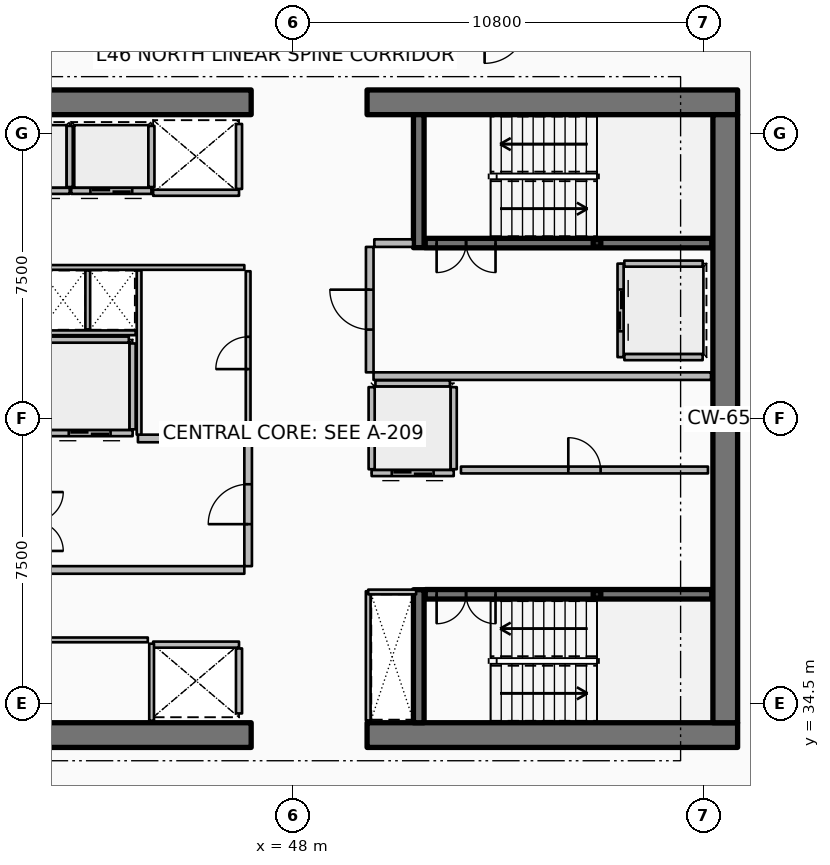
"""IFC4 building model, lengths in metres.
Left out: names, types, materials, properties, quantities, classifications, styles, units other than length and angle.
Written with IfcOpenShell. Run it as: python <this file> out.ifc"""

import sys

from ifc_helpers import new_model, si_unit, direction, frame, frame_2d, origin, origin_2d, place, context, subcontext, project, spatial, rectangle, hollow_rectangle, extrude, element, fill, save


model = new_model("IFC4")
c1 = context("Model", 3, precision=1e-05, world=origin(), true_north=direction((0.0, 1.0)))
c2 = subcontext(c1, "Body", "Model", "MODEL_VIEW")
j1 = project(units=[si_unit("LENGTHUNIT", "METRE"), si_unit("PLANEANGLEUNIT", "RADIAN")], contexts=[c1])
p1 = place(None, origin())
s1 = spatial("IfcSite", under=j1, at=p1, CompositionType="ELEMENT")
p2 = place(p1, origin())
s2 = spatial("IfcBuilding", under=s1, at=p2, CompositionType="ELEMENT")
p3 = place(p2, frame((0.0, 0.0, 184.05)))
s3 = spatial("IfcBuildingStorey", under=s2, at=p3, CompositionType="ELEMENT", Elevation=184.05)
for number, where, z_axis, x_axis in (
    (1, (37.15, 33.675, 0.0), (0.0, 0.0, 1.0), (1.0, 0.0, 0.0)),
    (2, (49.95, 33.675, 0.0), (0.0, 0.0, 1.0), (1.0, 0.0, 0.0)),
    (3, (37.15, 50.325, 0.0), (0.0, 0.0, 1.0), (1.0, 0.0, 0.0)),
    (4, (49.95, 50.325, 0.0), (0.0, 0.0, 1.0), (1.0, 0.0, 0.0)),
):
    element("IfcWall", number, at=place(p3, frame(where, z_axis=z_axis, x_axis=x_axis)), inside=s3, PredefinedType="SHEAR", context=c2, shape_type="SweptSolid", body=[
        extrude(rectangle(XDim=9.75, YDim=0.65, at=frame_2d((4.875, 0.0))), origin(), (0.0, 0.0, 1.0), 3.75),
    ])
p4 = place(p3, frame((59.375, 34.0, 0.0), z_axis=(0.0, 0.0, 1.0), x_axis=(0.0, 1.0, 0.0)))
e5 = element("IfcWall", 5, at=p4, inside=s3, PredefinedType="SHEAR", context=c2, shape_type="SweptSolid", body=[
    extrude(rectangle(XDim=16.0, YDim=0.65, at=frame_2d((8.0, 0.0))), origin(), (0.0, 0.0, 1.0), 3.75),
])
for number, where, z_axis, x_axis in (
    (6, (51.31, 46.5, 0.0), (0.0, 0.0, 1.0), (0.0, 1.0, 0.0)),
    (7, (51.31, 34.0, 0.0), (0.0, 0.0, 1.0), (0.0, 1.0, 0.0)),
):
    element("IfcWall", number, at=place(p3, frame(where, z_axis=z_axis, x_axis=x_axis)), inside=s3, PredefinedType="SHEAR", context=c2, shape_type="SweptSolid", body=[
        extrude(rectangle(XDim=3.5, YDim=0.28, at=frame_2d((1.75, 0.0))), origin(), (0.0, 0.0, 1.0), 3.75),
    ])
for number, where, z_axis, x_axis in (
    (8, (56.0, 46.62, 0.0), (0.0, 0.0, 1.0), (1.0, 0.0, 0.0)),
    (9, (56.0, 37.38, 0.0), (0.0, 0.0, 1.0), (1.0, 0.0, 0.0)),
):
    element("IfcColumn", number, at=place(p3, frame(where, z_axis=z_axis, x_axis=x_axis)), inside=s3, PredefinedType="COLUMN", context=c2, shape_type="SweptSolid", body=[
        extrude(hollow_rectangle(XDim=0.2, YDim=0.2, WallThickness=0.01, InnerFilletRadius=0.01, OuterFilletRadius=0.02, at=origin_2d()), origin(), (0.0, 0.0, 1.0), 1.67),
    ])
p5 = place(p3, frame((51.48, 46.62, 0.0), z_axis=(0.0, 0.0, 1.0), x_axis=(1.0, 0.0, 0.0)))
e10 = element("IfcWall", 10, at=p5, inside=s3, PredefinedType="SOLIDWALL", context=c2, shape_type="SweptSolid", body=[
    extrude(rectangle(XDim=7.54, YDim=0.25, at=frame_2d((3.77, 0.0))), origin(), (0.0, 0.0, 1.0), 3.5),
])
p6 = place(p5, frame((0.3, 0.0, 0.0)))
e11 = element("IfcOpeningElement", 11, at=p6, cuts=e10, PredefinedType="OPENING", context=c2, shape_type="SweptSolid", body=[
    extrude(rectangle(XDim=1.55, YDim=2.15, at=frame_2d((0.775, 1.075))), frame((0.0, 0.135, 0.0), z_axis=(0.0, -1.0, 0.0), x_axis=(1.0, 0.0, 0.0)), (0.0, 0.0, 1.0), 0.27),
])
p7 = place(p3, frame((51.48, 37.38, 0.0), z_axis=(0.0, 0.0, 1.0), x_axis=(1.0, 0.0, 0.0)))
e12 = element("IfcWall", 12, at=p7, inside=s3, PredefinedType="SOLIDWALL", context=c2, shape_type="SweptSolid", body=[
    extrude(rectangle(XDim=7.54, YDim=0.25, at=frame_2d((3.77, 0.0))), origin(), (0.0, 0.0, 1.0), 3.5),
])
p8 = place(p7, frame((0.3, 0.0, 0.0)))
e13 = element("IfcOpeningElement", 13, at=p8, cuts=e12, PredefinedType="OPENING", context=c2, shape_type="SweptSolid", body=[
    extrude(rectangle(XDim=1.55, YDim=2.15, at=frame_2d((0.775, 1.075))), frame((0.0, 0.135, 0.0), z_axis=(0.0, -1.0, 0.0), x_axis=(1.0, 0.0, 0.0)), (0.0, 0.0, 1.0), 0.27),
])
p9 = place(p3, frame((42.125, 47.995, 0.0), z_axis=(0.0, 0.0, 1.0), x_axis=(-1.0, 0.0, 0.0)))
e14 = element("IfcWall", 14, at=p9, inside=s3, PredefinedType="PARTITIONING", context=c2, shape_type="SweptSolid", body=[
    extrude(rectangle(XDim=2.11, YDim=0.16, at=frame_2d((1.055, 0.0))), origin(), (0.0, 0.0, 1.0), 3.5),
])
p10 = place(p9, frame((0.505, 0.0, 0.0)))
e15 = element("IfcOpeningElement", 15, at=p10, cuts=e14, PredefinedType="OPENING", context=c2, shape_type="SweptSolid", body=[
    extrude(rectangle(XDim=1.1, YDim=2.1, at=frame_2d((0.55, 1.05))), frame((0.0, 0.09, 0.0), z_axis=(0.0, -1.0, 0.0), x_axis=(1.0, 0.0, 0.0)), (0.0, 0.0, 1.0), 0.18),
])
p11 = place(p3, frame((42.125, 48.095, 0.0), z_axis=(0.0, 0.0, 1.0), x_axis=(0.0, 1.0, 0.0)))
e16 = element("IfcWall", 16, at=p11, inside=s3, PredefinedType="PARTITIONING", context=c2, shape_type="SweptSolid", body=[
    extrude(rectangle(XDim=1.61, YDim=0.16, at=frame_2d((0.805, 0.0))), origin(), (0.0, 0.0, 1.0), 3.5),
])
p12 = place(p3, frame((44.275, 47.995, 0.0), z_axis=(0.0, 0.0, 1.0), x_axis=(-1.0, 0.0, 0.0)))
e17 = element("IfcWall", 17, at=p12, inside=s3, PredefinedType="PARTITIONING", context=c2, shape_type="SweptSolid", body=[
    extrude(rectangle(XDim=2.11, YDim=0.16, at=frame_2d((1.055, 0.0))), origin(), (0.0, 0.0, 1.0), 3.5),
])
p13 = place(p12, frame((0.505, 0.0, 0.0)))
e18 = element("IfcOpeningElement", 18, at=p13, cuts=e17, PredefinedType="OPENING", context=c2, shape_type="SweptSolid", body=[
    extrude(rectangle(XDim=1.1, YDim=2.1, at=frame_2d((0.55, 1.05))), frame((0.0, 0.09, 0.0), z_axis=(0.0, -1.0, 0.0), x_axis=(1.0, 0.0, 0.0)), (0.0, 0.0, 1.0), 0.18),
])
p14 = place(p3, frame((44.275, 48.095, 0.0), z_axis=(0.0, 0.0, 1.0), x_axis=(0.0, 1.0, 0.0)))
e19 = element("IfcWall", 19, at=p14, inside=s3, PredefinedType="PARTITIONING", context=c2, shape_type="SweptSolid", body=[
    extrude(rectangle(XDim=1.61, YDim=0.16, at=frame_2d((0.805, 0.0))), origin(), (0.0, 0.0, 1.0), 3.5),
])
p15 = place(p3, frame((46.58, 47.945, 0.0), z_axis=(0.0, 0.0, 1.0), x_axis=(-1.0, 0.0, 0.0)))
e20 = element("IfcWall", 20, at=p15, inside=s3, PredefinedType="PARTITIONING", context=c2, shape_type="SweptSolid", body=[
    extrude(rectangle(XDim=2.26, YDim=0.16, at=frame_2d((1.13, 0.0))), origin(), (0.0, 0.0, 1.0), 3.5),
])
p16 = place(p3, frame((46.58, 48.045, 0.0), z_axis=(0.0, 0.0, 1.0), x_axis=(0.0, 1.0, 0.0)))
e21 = element("IfcWall", 21, at=p16, inside=s3, PredefinedType="PARTITIONING", context=c2, shape_type="SweptSolid", body=[
    extrude(rectangle(XDim=1.71, YDim=0.16, at=frame_2d((0.855, 0.0))), origin(), (0.0, 0.0, 1.0), 3.5),
])
p17 = place(p3, frame((44.32, 36.055, 0.0), z_axis=(0.0, 0.0, 1.0), x_axis=(1.0, 0.0, 0.0)))
e22 = element("IfcWall", 22, at=p17, inside=s3, PredefinedType="PARTITIONING", context=c2, shape_type="SweptSolid", body=[
    extrude(rectangle(XDim=2.26, YDim=0.16, at=frame_2d((1.13, 0.0))), origin(), (0.0, 0.0, 1.0), 3.5),
])
p18 = place(p3, frame((46.58, 34.245, 0.0), z_axis=(0.0, 0.0, 1.0), x_axis=(0.0, 1.0, 0.0)))
e23 = element("IfcWall", 23, at=p18, inside=s3, PredefinedType="PARTITIONING", context=c2, shape_type="SweptSolid", body=[
    extrude(rectangle(XDim=1.71, YDim=0.16, at=frame_2d((0.855, 0.0))), origin(), (0.0, 0.0, 1.0), 3.5),
])
p19 = place(p3, frame((43.78, 41.62, 0.0), z_axis=(0.0, 0.0, 1.0), x_axis=(-1.0, 0.0, 0.0)))
e24 = element("IfcWall", 24, at=p19, inside=s3, PredefinedType="PARTITIONING", context=c2, shape_type="SweptSolid", body=[
    extrude(rectangle(XDim=2.26, YDim=0.16, at=frame_2d((1.13, 0.0))), origin(), (0.0, 0.0, 1.0), 3.5),
])
p20 = place(p19, frame((0.58, 0.0, 0.0)))
e25 = element("IfcOpeningElement", 25, at=p20, cuts=e24, PredefinedType="OPENING", context=c2, shape_type="SweptSolid", body=[
    extrude(rectangle(XDim=1.1, YDim=2.1, at=frame_2d((0.55, 1.05))), frame((0.0, 0.09, 0.0), z_axis=(0.0, -1.0, 0.0), x_axis=(1.0, 0.0, 0.0)), (0.0, 0.0, 1.0), 0.18),
])
p21 = place(p3, frame((43.78, 41.72, 0.0), z_axis=(0.0, 0.0, 1.0), x_axis=(0.0, 1.0, 0.0)))
e26 = element("IfcWall", 26, at=p21, inside=s3, PredefinedType="PARTITIONING", context=c2, shape_type="SweptSolid", body=[
    extrude(rectangle(XDim=2.26, YDim=0.16, at=frame_2d((1.13, 0.0))), origin(), (0.0, 0.0, 1.0), 3.5),
])
p22 = place(p3, frame((41.62, 44.08, 0.0), z_axis=(0.0, 0.0, 1.0), x_axis=(1.0, 0.0, 0.0)))
e27 = element("IfcWall", 27, at=p22, inside=s3, PredefinedType="PARTITIONING", context=c2, shape_type="SweptSolid", body=[
    extrude(rectangle(XDim=2.06, YDim=0.16, at=frame_2d((1.03, 0.0))), origin(), (0.0, 0.0, 1.0), 3.5),
])
p23 = place(p3, frame((56.62, 46.08, 0.0), z_axis=(0.0, 0.0, 1.0), x_axis=(0.0, -1.0, 0.0)))
e28 = element("IfcWall", 28, at=p23, inside=s3, PredefinedType="PARTITIONING", context=c2, shape_type="SweptSolid", body=[
    extrude(rectangle(XDim=2.46, YDim=0.16, at=frame_2d((1.23, 0.0))), origin(), (0.0, 0.0, 1.0), 3.5),
])
p24 = place(p23, frame((0.68, 0.0, 0.0)))
e29 = element("IfcOpeningElement", 29, at=p24, cuts=e28, PredefinedType="OPENING", context=c2, shape_type="SweptSolid", body=[
    extrude(rectangle(XDim=1.1, YDim=2.1, at=frame_2d((0.55, 1.05))), frame((0.0, 0.09, 0.0), z_axis=(0.0, -1.0, 0.0), x_axis=(1.0, 0.0, 0.0)), (0.0, 0.0, 1.0), 0.18),
])
for number, where, z_axis, x_axis in (
    (30, (56.72, 46.08, 0.0), (0.0, 0.0, 1.0), (1.0, 0.0, 0.0)),
    (31, (56.72, 43.62, 0.0), (0.0, 0.0, 1.0), (1.0, 0.0, 0.0)),
):
    element("IfcWall", number, at=place(p3, frame(where, z_axis=z_axis, x_axis=x_axis)), inside=s3, PredefinedType="PARTITIONING", context=c2, shape_type="SweptSolid", body=[
        extrude(rectangle(XDim=2.06, YDim=0.16, at=frame_2d((1.03, 0.0))), origin(), (0.0, 0.0, 1.0), 3.5),
    ])
p25 = place(p3, frame((52.23, 40.57, 0.0), z_axis=(0.0, 0.0, 1.0), x_axis=(-1.0, 0.0, 0.0)))
e32 = element("IfcWall", 32, at=p25, inside=s3, PredefinedType="PARTITIONING", context=c2, shape_type="SweptSolid", body=[
    extrude(rectangle(XDim=2.16, YDim=0.16, at=frame_2d((1.08, 0.0))), origin(), (0.0, 0.0, 1.0), 3.5),
])
p26 = place(p25, frame((0.53, 0.0, 0.0)))
e33 = element("IfcOpeningElement", 33, at=p26, cuts=e32, PredefinedType="OPENING", context=c2, shape_type="SweptSolid", body=[
    extrude(rectangle(XDim=1.1, YDim=2.1, at=frame_2d((0.55, 1.05))), frame((0.0, 0.09, 0.0), z_axis=(0.0, -1.0, 0.0), x_axis=(1.0, 0.0, 0.0)), (0.0, 0.0, 1.0), 0.18),
])
for number, where, z_axis, x_axis in (
    (34, (52.23, 40.67, 0.0), (0.0, 0.0, 1.0), (0.0, 1.0, 0.0)),
    (35, (50.07, 40.67, 0.0), (0.0, 0.0, 1.0), (0.0, 1.0, 0.0)),
):
    element("IfcWall", number, at=place(p3, frame(where, z_axis=z_axis, x_axis=x_axis)), inside=s3, PredefinedType="PARTITIONING", context=c2, shape_type="SweptSolid", body=[
        extrude(rectangle(XDim=2.16, YDim=0.16, at=frame_2d((1.08, 0.0))), origin(), (0.0, 0.0, 1.0), 3.5),
    ])
p27 = place(p3, frame((50.17, 42.93, 0.0), z_axis=(0.0, 0.0, 1.0), x_axis=(1.0, 0.0, 0.0)))
e36 = element("IfcWall", 36, at=p27, inside=s3, PredefinedType="PARTITIONING", context=c2, shape_type="SweptSolid", body=[
    extrude(rectangle(XDim=1.96, YDim=0.16, at=frame_2d((0.98, 0.0))), origin(), (0.0, 0.0, 1.0), 3.5),
])
p28 = place(p3, frame((52.42, 40.65, 0.0), z_axis=(0.0, 0.0, 1.0), x_axis=(1.0, 0.0, 0.0)))
e37 = element("IfcWall", 37, at=p28, inside=s3, PredefinedType="PARTITIONING", context=c2, shape_type="SweptSolid", body=[
    extrude(rectangle(XDim=6.5, YDim=0.18, at=frame_2d((3.25, 0.0))), origin(), (0.0, 0.0, 1.0), 3.5),
])
p29 = place(p28, frame((2.825, 0.0, 0.0)))
e38 = element("IfcOpeningElement", 38, at=p29, cuts=e37, PredefinedType="OPENING", context=c2, shape_type="SweptSolid", body=[
    extrude(rectangle(XDim=0.85, YDim=2.06, at=frame_2d((0.425, 1.03))), frame((0.0, 0.1, 0.0), z_axis=(0.0, -1.0, 0.0), x_axis=(1.0, 0.0, 0.0)), (0.0, 0.0, 1.0), 0.2),
])
p30 = place(p3, frame((44.28, 34.05, 0.0), z_axis=(0.0, 0.0, 1.0), x_axis=(0.0, 1.0, 0.0)))
e39 = element("IfcWall", 39, at=p30, inside=s3, PredefinedType="PARTITIONING", context=c2, shape_type="SweptSolid", body=[
    extrude(rectangle(XDim=2.03, YDim=0.125, at=frame_2d((1.015, 0.0))), origin(), (0.0, 0.0, 1.0), 2.94),
])
p31 = place(p3, frame((37.92, 36.18, 0.0), z_axis=(0.0, 0.0, 1.0), x_axis=(1.0, 0.0, 0.0)))
e40 = element("IfcWall", 40, at=p31, inside=s3, PredefinedType="PARTITIONING", context=c2, shape_type="SweptSolid", body=[
    extrude(rectangle(XDim=6.26, YDim=0.125, at=frame_2d((3.13, 0.0))), origin(), (0.0, 0.0, 1.0), 2.94),
])
p32 = place(p31, frame((2.705, 0.0, 0.0)))
e41 = element("IfcOpeningElement", 41, at=p32, cuts=e40, PredefinedType="OPENING", context=c2, shape_type="SweptSolid", body=[
    extrude(rectangle(XDim=0.85, YDim=2.06, at=frame_2d((0.425, 1.03))), frame((0.0, 0.073, 0.0), z_axis=(0.0, -1.0, 0.0), x_axis=(1.0, 0.0, 0.0)), (0.0, 0.0, 1.0), 0.145),
])
p33 = place(p3, frame((41.35, 38.02, 0.0), z_axis=(0.0, 0.0, 1.0), x_axis=(1.0, 0.0, 0.0)))
e42 = element("IfcWall", 42, at=p33, inside=s3, PredefinedType="PARTITIONING", context=c2, shape_type="SweptSolid", body=[
    extrude(rectangle(XDim=5.37, YDim=0.2, at=frame_2d((2.685, 0.0))), origin(), (0.0, 0.0, 1.0), 3.5),
])
p34 = place(p3, frame((43.92, 41.48, 0.0), z_axis=(0.0, 0.0, 1.0), x_axis=(1.0, 0.0, 0.0)))
e43 = element("IfcWall", 43, at=p34, inside=s3, PredefinedType="PARTITIONING", context=c2, shape_type="SweptSolid", body=[
    extrude(rectangle(XDim=2.8, YDim=0.2, at=frame_2d((1.4, 0.0))), origin(), (0.0, 0.0, 1.0), 3.5),
])
p35 = place(p3, frame((46.82, 38.12, 0.0), z_axis=(0.0, 0.0, 1.0), x_axis=(0.0, 1.0, 0.0)))
e44 = element("IfcWall", 44, at=p35, inside=s3, PredefinedType="PARTITIONING", context=c2, shape_type="SweptSolid", body=[
    extrude(rectangle(XDim=3.26, YDim=0.2, at=frame_2d((1.63, 0.0))), origin(), (0.0, 0.0, 1.0), 3.5),
])
p36 = place(p35, frame((1.105, 0.0, 0.0)))
e45 = element("IfcOpeningElement", 45, at=p36, cuts=e44, PredefinedType="OPENING", context=c2, shape_type="SweptSolid", body=[
    extrude(rectangle(XDim=1.05, YDim=2.1, at=frame_2d((0.525, 1.05))), frame((0.0, 0.11, 0.0), z_axis=(0.0, -1.0, 0.0), x_axis=(1.0, 0.0, 0.0)), (0.0, 0.0, 1.0), 0.22),
])
p37 = place(p3, frame((50.12, 43.12, 0.0), z_axis=(0.0, 0.0, 1.0), x_axis=(1.0, 0.0, 0.0)))
e46 = element("IfcWall", 46, at=p37, inside=s3, PredefinedType="PARTITIONING", context=c2, shape_type="SweptSolid", body=[
    extrude(rectangle(XDim=8.88, YDim=0.2, at=frame_2d((4.44, 0.0))), origin(), (0.0, 0.0, 1.0), 3.5),
])
p38 = place(p3, frame((50.14, 46.62, 0.0), z_axis=(0.0, 0.0, 1.0), x_axis=(1.0, 0.0, 0.0)))
e47 = element("IfcWall", 47, at=p38, inside=s3, PredefinedType="PARTITIONING", context=c2, shape_type="SweptSolid", body=[
    extrude(rectangle(XDim=1.02, YDim=0.2, at=frame_2d((0.51, 0.0))), origin(), (0.0, 0.0, 1.0), 3.5),
])
p39 = place(p3, frame((50.02, 43.22, 0.0), z_axis=(0.0, 0.0, 1.0), x_axis=(0.0, 1.0, 0.0)))
e48 = element("IfcWall", 48, at=p39, inside=s3, PredefinedType="PARTITIONING", context=c2, shape_type="SweptSolid", body=[
    extrude(rectangle(XDim=3.3, YDim=0.2, at=frame_2d((1.65, 0.0))), origin(), (0.0, 0.0, 1.0), 3.5),
])
p40 = place(p39, frame((1.125, 0.0, 0.0)))
e49 = element("IfcOpeningElement", 49, at=p40, cuts=e48, PredefinedType="OPENING", context=c2, shape_type="SweptSolid", body=[
    extrude(rectangle(XDim=1.05, YDim=2.1, at=frame_2d((0.525, 1.05))), frame((0.0, 0.11, 0.0), z_axis=(0.0, -1.0, 0.0), x_axis=(1.0, 0.0, 0.0)), (0.0, 0.0, 1.0), 0.22),
])
p41 = place(p3, frame((41.36, 45.98, 0.0), z_axis=(0.0, 0.0, 1.0), x_axis=(1.0, 0.0, 0.0)))
e50 = element("IfcWall", 50, at=p41, inside=s3, PredefinedType="PARTITIONING", context=c2, shape_type="SweptSolid", body=[
    extrude(rectangle(XDim=5.36, YDim=0.125, at=frame_2d((2.68, 0.0))), origin(), (0.0, 0.0, 1.0), 2.94),
])
p42 = place(p3, frame((41.36, 44.26, 0.0), z_axis=(0.0, 0.0, 1.0), x_axis=(1.0, 0.0, 0.0)))
e51 = element("IfcWall", 51, at=p42, inside=s3, PredefinedType="PARTITIONING", context=c2, shape_type="SweptSolid", body=[
    extrude(rectangle(XDim=2.5, YDim=0.125, at=frame_2d((1.25, 0.0))), origin(), (0.0, 0.0, 1.0), 2.94),
])
p43 = place(p3, frame((42.6, 44.35, 0.0), z_axis=(0.0, 0.0, 1.0), x_axis=(0.0, 1.0, 0.0)))
e52 = element("IfcWall", 52, at=p43, inside=s3, PredefinedType="PARTITIONING", context=c2, shape_type="SweptSolid", body=[
    extrude(rectangle(XDim=1.55, YDim=0.125, at=frame_2d((0.775, 0.0))), origin(), (0.0, 0.0, 1.0), 2.94),
])
p44 = place(p3, frame((49.98, 34.06, 0.0), z_axis=(0.0, 0.0, 1.0), x_axis=(0.0, 1.0, 0.0)))
e53 = element("IfcWall", 53, at=p44, inside=s3, PredefinedType="PARTITIONING", context=c2, shape_type="SweptSolid", body=[
    extrude(rectangle(XDim=3.4, YDim=0.125, at=frame_2d((1.7, 0.0))), origin(), (0.0, 0.0, 1.0), 2.94),
])
p45 = place(p3, frame((49.98, 37.44, 0.0), z_axis=(0.0, 0.0, 1.0), x_axis=(1.0, 0.0, 0.0)))
e54 = element("IfcWall", 54, at=p45, inside=s3, PredefinedType="PARTITIONING", context=c2, shape_type="SweptSolid", body=[
    extrude(rectangle(XDim=1.26, YDim=0.125, at=frame_2d((0.63, 0.0))), origin(), (0.0, 0.0, 1.0), 2.94),
])
p46 = place(p3, frame((43.95, 41.58, 0.0), z_axis=(0.0, 0.0, 1.0), x_axis=(0.0, 1.0, 0.0)))
e55 = element("IfcWall", 55, at=p46, inside=s3, PredefinedType="PARTITIONING", context=c2, shape_type="SweptSolid", body=[
    extrude(rectangle(XDim=4.32, YDim=0.125, at=frame_2d((2.16, 0.0))), origin(), (0.0, 0.0, 1.0), 2.94),
])
p47 = place(p3, frame((46.82, 41.58, 0.0), z_axis=(0.0, 0.0, 1.0), x_axis=(0.0, 1.0, 0.0)))
e56 = element("IfcWall", 56, at=p47, inside=s3, PredefinedType="PARTITIONING", context=c2, shape_type="SweptSolid", body=[
    extrude(rectangle(XDim=4.3, YDim=0.125, at=frame_2d((2.15, 0.0))), origin(), (0.0, 0.0, 1.0), 2.94),
])
p48 = place(p47, frame((1.725, 0.0, 0.0)))
e57 = element("IfcOpeningElement", 57, at=p48, cuts=e56, PredefinedType="OPENING", context=c2, shape_type="SweptSolid", body=[
    extrude(rectangle(XDim=0.85, YDim=2.06, at=frame_2d((0.425, 1.03))), frame((0.0, 0.073, 0.0), z_axis=(0.0, -1.0, 0.0), x_axis=(1.0, 0.0, 0.0)), (0.0, 0.0, 1.0), 0.145),
])
p49 = place(p6, origin())
e58 = element("IfcDoor", 58, at=p49, inside=s3, OperationType="DOUBLE_DOOR_SINGLE_SWING", PredefinedType="DOOR", context=c2, shape_type="SweptSolid", body=[
    extrude(rectangle(XDim=1.55, YDim=2.15, at=frame_2d((0.775, 1.075))), frame((0.0, 0.025, 0.0), z_axis=(0.0, -1.0, 0.0), x_axis=(1.0, 0.0, 0.0)), (0.0, 0.0, 1.0), 0.05),
])
fill(e11, e58)
p50 = place(p8, origin())
e59 = element("IfcDoor", 59, at=p50, inside=s3, OperationType="DOUBLE_DOOR_SINGLE_SWING", PredefinedType="DOOR", context=c2, shape_type="SweptSolid", body=[
    extrude(rectangle(XDim=1.55, YDim=2.15, at=frame_2d((0.775, 1.075))), frame((0.0, 0.025, 0.0), z_axis=(0.0, -1.0, 0.0), x_axis=(1.0, 0.0, 0.0)), (0.0, 0.0, 1.0), 0.05),
])
fill(e13, e59)
p51 = place(p13, origin())
e60 = element("IfcDoor", 60, at=p51, inside=s3, OperationType="DOUBLE_DOOR_SLIDING", PredefinedType="DOOR", context=c2, shape_type="SweptSolid", body=[
    extrude(rectangle(XDim=1.1, YDim=2.1, at=frame_2d((0.55, 1.05))), frame((0.0, 0.025, 0.0), z_axis=(0.0, -1.0, 0.0), x_axis=(1.0, 0.0, 0.0)), (0.0, 0.0, 1.0), 0.05),
])
fill(e18, e60)
p52 = place(p20, origin())
e61 = element("IfcDoor", 61, at=p52, inside=s3, OperationType="DOUBLE_DOOR_SLIDING", PredefinedType="DOOR", context=c2, shape_type="SweptSolid", body=[
    extrude(rectangle(XDim=1.1, YDim=2.1, at=frame_2d((0.55, 1.05))), frame((0.0, 0.025, 0.0), z_axis=(0.0, -1.0, 0.0), x_axis=(1.0, 0.0, 0.0)), (0.0, 0.0, 1.0), 0.05),
])
fill(e25, e61)
p53 = place(p24, origin())
e62 = element("IfcDoor", 62, at=p53, inside=s3, OperationType="DOUBLE_DOOR_SLIDING", PredefinedType="DOOR", context=c2, shape_type="SweptSolid", body=[
    extrude(rectangle(XDim=1.1, YDim=2.1, at=frame_2d((0.55, 1.05))), frame((0.0, 0.025, 0.0), z_axis=(0.0, -1.0, 0.0), x_axis=(1.0, 0.0, 0.0)), (0.0, 0.0, 1.0), 0.05),
])
fill(e29, e62)
p54 = place(p26, origin())
e63 = element("IfcDoor", 63, at=p54, inside=s3, OperationType="DOUBLE_DOOR_SLIDING", PredefinedType="DOOR", context=c2, shape_type="SweptSolid", body=[
    extrude(rectangle(XDim=1.1, YDim=2.1, at=frame_2d((0.55, 1.05))), frame((0.0, 0.025, 0.0), z_axis=(0.0, -1.0, 0.0), x_axis=(1.0, 0.0, 0.0)), (0.0, 0.0, 1.0), 0.05),
])
fill(e33, e63)
p55 = place(p29, origin())
e64 = element("IfcDoor", 64, at=p55, inside=s3, OperationType="SINGLE_SWING_LEFT", PredefinedType="DOOR", context=c2, shape_type="SweptSolid", body=[
    extrude(rectangle(XDim=0.85, YDim=2.06, at=frame_2d((0.425, 1.03))), frame((0.0, 0.025, 0.0), z_axis=(0.0, -1.0, 0.0), x_axis=(1.0, 0.0, 0.0)), (0.0, 0.0, 1.0), 0.05),
])
fill(e38, e64)
p56 = place(p36, origin())
e65 = element("IfcDoor", 65, at=p56, inside=s3, OperationType="SINGLE_SWING_LEFT", PredefinedType="DOOR", context=c2, shape_type="SweptSolid", body=[
    extrude(rectangle(XDim=1.05, YDim=2.1, at=frame_2d((0.525, 1.05))), frame((0.0, 0.025, 0.0), z_axis=(0.0, -1.0, 0.0), x_axis=(1.0, 0.0, 0.0)), (0.0, 0.0, 1.0), 0.05),
])
fill(e45, e65)
p57 = place(p40, origin())
e66 = element("IfcDoor", 66, at=p57, inside=s3, OperationType="SINGLE_SWING_RIGHT", PredefinedType="DOOR", context=c2, shape_type="SweptSolid", body=[
    extrude(rectangle(XDim=1.05, YDim=2.1, at=frame_2d((0.525, 1.05))), frame((0.0, 0.025, 0.0), z_axis=(0.0, -1.0, 0.0), x_axis=(1.0, 0.0, 0.0)), (0.0, 0.0, 1.0), 0.05),
])
fill(e49, e66)
p58 = place(p48, origin())
e67 = element("IfcDoor", 67, at=p58, inside=s3, OperationType="SINGLE_SWING_LEFT", PredefinedType="DOOR", context=c2, shape_type="SweptSolid", body=[
    extrude(rectangle(XDim=0.85, YDim=2.06, at=frame_2d((0.425, 1.03))), frame((0.0, 0.025, 0.0), z_axis=(0.0, -1.0, 0.0), x_axis=(1.0, 0.0, 0.0)), (0.0, 0.0, 1.0), 0.05),
])
fill(e57, e67)
save(model, sys.argv[1])
